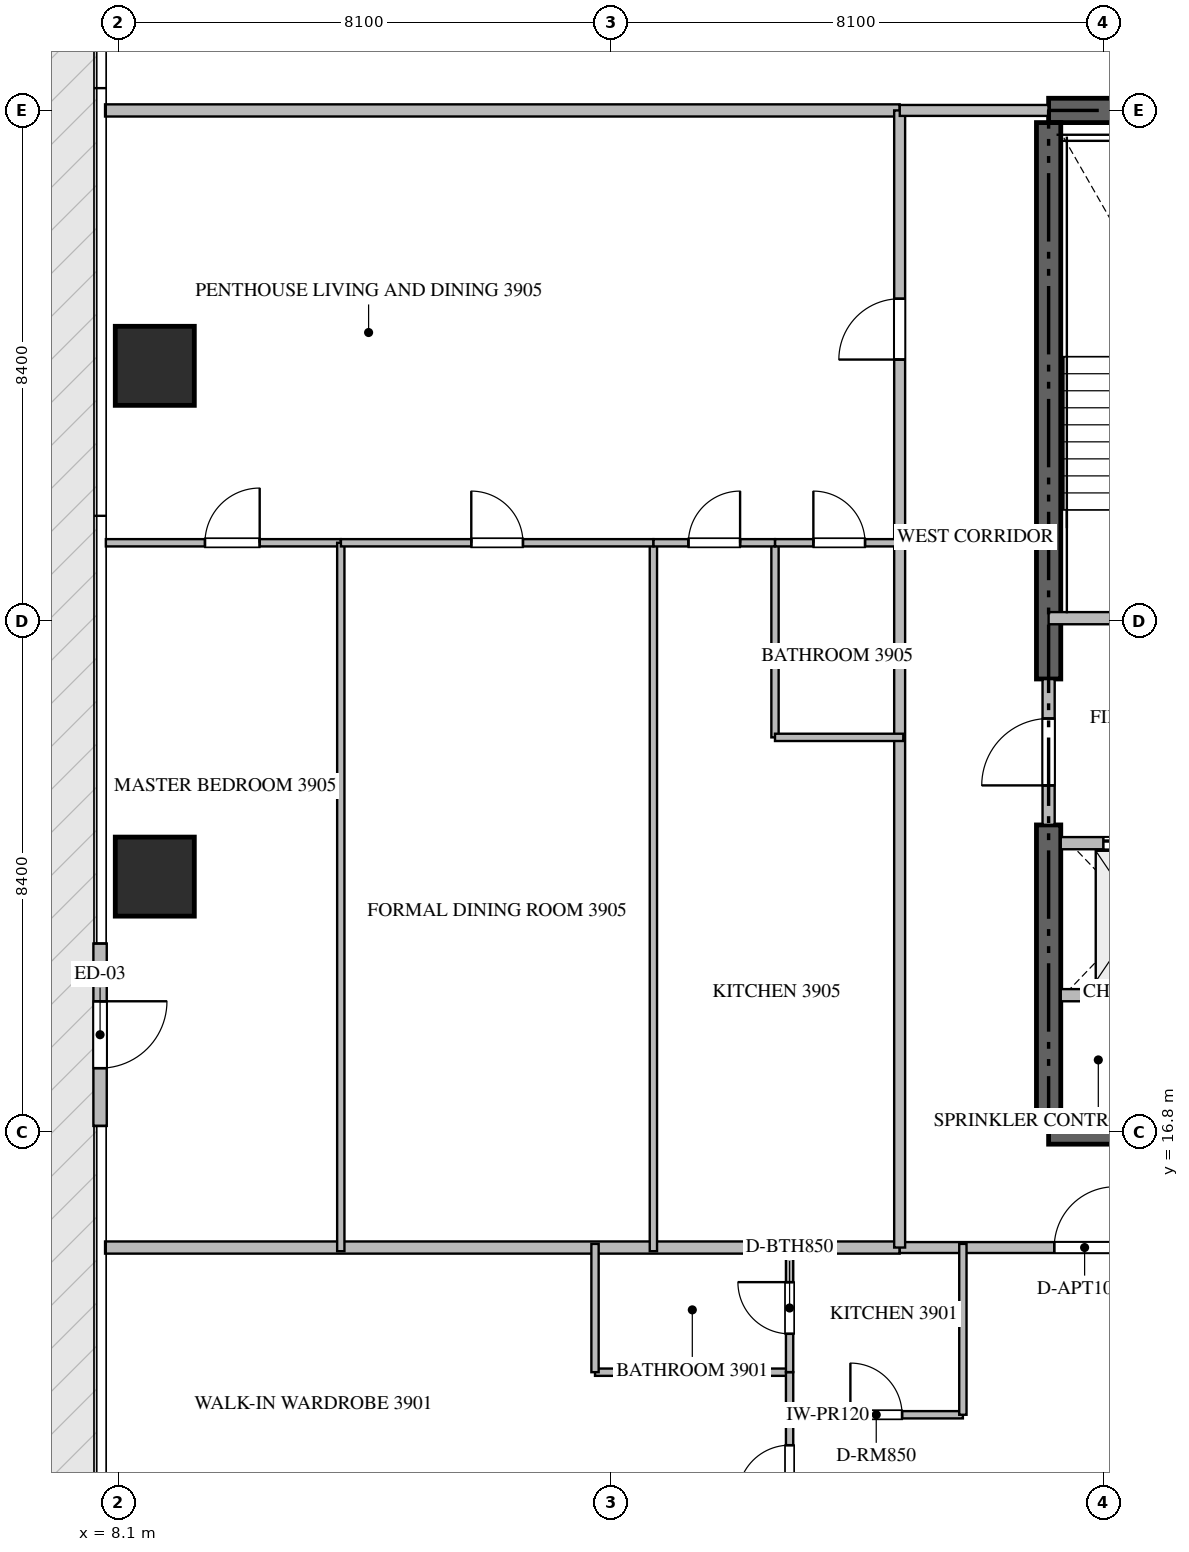
"""IFC4 building model, lengths in metres.
Left out: names, types, materials, properties, quantities, classifications, styles, units other than length and angle.
Written with IfcOpenShell. Run it as: python <this file> out.ifc"""

import sys

from ifc_helpers import new_model, si_unit, direction, frame, frame_2d, origin, origin_2d, place, context, subcontext, project, spatial, rectangle, extrude, source, transform, mapped, element, fill, save


model = new_model("IFC4")
c1 = context("Model", 3, precision=1e-05, world=origin(), true_north=direction((0.0, 1.0)))
c2 = subcontext(c1, "Body", "Model", "MODEL_VIEW")
j1 = project(units=[si_unit("LENGTHUNIT", "METRE"), si_unit("PLANEANGLEUNIT", "RADIAN")], contexts=[c1])
p1 = place(None, origin())
s1 = spatial("IfcSite", under=j1, at=p1, CompositionType="ELEMENT")
p2 = place(p1, origin())
s2 = spatial("IfcBuilding", under=s1, at=p2, CompositionType="ELEMENT")
p3 = place(p2, frame((0.0, 0.0, 157.65)))
s3 = spatial("IfcBuildingStorey", under=s2, at=p3, CompositionType="ELEMENT", Elevation=157.65)
for number, where, z_axis, x_axis in (
    (1, (23.4, 16.8, -0.26), (0.0, 0.0, 1.0), (1.0, 0.0, 0.0)),
    (2, (41.4, 33.6, -0.26), (0.0, 0.0, 1.0), (-1.0, 0.0, 0.0)),
):
    element("IfcWall", number, at=place(p3, frame(where, z_axis=z_axis, x_axis=x_axis)), inside=s3, PredefinedType="SHEAR", context=c2, shape_type="SweptSolid", body=[
        extrude(rectangle(XDim=18.0, YDim=0.4, at=frame_2d((9.0, 0.0))), origin(), (0.0, 0.0, 1.0), 3.748),
    ])
p4 = place(p3, frame((23.4, 17.0, -0.26), z_axis=(0.0, 0.0, 1.0), x_axis=(0.0, 1.0, 0.0)))
e3 = element("IfcWall", 3, at=p4, inside=s3, PredefinedType="SHEAR", context=c2, shape_type="SweptSolid", body=[
    extrude(rectangle(XDim=4.85, YDim=0.4, at=frame_2d((2.425, 0.0))), origin(), (0.0, 0.0, 1.0), 3.748),
])
p5 = place(p3, frame((23.4, 24.25, -0.26), z_axis=(0.0, 0.0, 1.0), x_axis=(0.0, 1.0, 0.0)))
e4 = element("IfcWall", 4, at=p5, inside=s3, PredefinedType="SHEAR", context=c2, shape_type="SweptSolid", body=[
    extrude(rectangle(XDim=9.15, YDim=0.4, at=frame_2d((4.575, 0.0))), origin(), (0.0, 0.0, 1.0), 3.748),
])
m1 = source(origin(), c2, "Body", "SweptSolid", [
    extrude(rectangle(XDim=1.3, YDim=1.3, at=origin_2d()), origin(), (0.0, 0.0, 1.0), 3.75),
])
for number, where, z_axis, x_axis in (
    (5, (8.7, 21.0, -0.26), (0.0, 0.0, 1.0), (1.0, 0.0, 0.0)),
    (6, (8.7, 29.4, -0.26), (0.0, 0.0, 1.0), (1.0, 0.0, 0.0)),
):
    element("IfcColumn", number, at=place(p3, frame(where, z_axis=z_axis, x_axis=x_axis)), inside=s3, PredefinedType="COLUMN", context=c2, shape_type="MappedRepresentation", body=[
        mapped(m1, transform((0.0, 0.0, 0.0), scale=1.0)),
    ])
p6 = place(p3, frame((7.8, 19.9, 0.0), z_axis=(0.0, 0.0, 1.0), x_axis=(0.0, -1.0, 0.0)))
e7 = element("IfcWall", 7, at=p6, inside=s3, PredefinedType="ELEMENTEDWALL", context=c2, shape_type="SweptSolid", body=[
    extrude(rectangle(XDim=3.0, YDim=0.22, at=frame_2d((1.5, 0.0))), origin(), (0.0, 0.0, 1.0), 3.475),
])
p7 = place(p6, frame((0.95, 0.0, 0.0)))
e8 = element("IfcOpeningElement", 8, at=p7, cuts=e7, PredefinedType="OPENING", context=c2, shape_type="SweptSolid", body=[
    extrude(rectangle(XDim=1.1, YDim=2.2, at=frame_2d((0.55, 1.1))), frame((0.0, 0.12, 0.0), z_axis=(0.0, -1.0, 0.0), x_axis=(1.0, 0.0, 0.0)), (0.0, 0.0, 1.0), 0.24),
])
p8 = place(p3, frame((23.4, 25.25, 0.0), z_axis=(0.0, 0.0, 1.0), x_axis=(1.0, 0.0, 0.0)))
e9 = element("IfcWall", 9, at=p8, inside=s3, PredefinedType="STANDARD", context=c2, shape_type="SweptSolid", body=[
    extrude(rectangle(XDim=4.45, YDim=0.2, at=frame_2d((2.225, 0.0))), origin(), (0.0, 0.0, 1.0), 3.49),
])
p9 = place(p8, frame((1.65, 0.0, 0.0)))
e10 = element("IfcOpeningElement", 10, at=p9, cuts=e9, PredefinedType="OPENING", context=c2, shape_type="SweptSolid", body=[
    extrude(rectangle(XDim=1.1, YDim=2.15, at=frame_2d((0.55, 1.075))), frame((0.0, 0.11, 0.0), z_axis=(0.0, -1.0, 0.0), x_axis=(1.0, 0.0, 0.0)), (0.0, 0.0, 1.0), 0.22),
])
p10 = place(p3, frame((23.6, 21.55, 0.0), z_axis=(0.0, 0.0, 1.0), x_axis=(1.0, 0.0, 0.0)))
e11 = element("IfcWall", 11, at=p10, inside=s3, PredefinedType="STANDARD", context=c2, shape_type="SweptSolid", body=[
    extrude(rectangle(XDim=2.45, YDim=0.2, at=frame_2d((1.225, 0.0))), origin(), (0.0, 0.0, 1.0), 3.49),
])
p11 = place(p10, frame((0.7, 0.0, 0.0)))
e12 = element("IfcOpeningElement", 12, at=p11, cuts=e11, PredefinedType="OPENING", context=c2, shape_type="SweptSolid", body=[
    extrude(rectangle(XDim=1.2, YDim=2.2, at=frame_2d((0.6, 1.1))), frame((0.0, 0.11, 0.0), z_axis=(0.0, -1.0, 0.0), x_axis=(1.0, 0.0, 0.0)), (0.0, 0.0, 1.0), 0.22),
])
p12 = place(p3, frame((23.6, 19.05, 0.0), z_axis=(0.0, 0.0, 1.0), x_axis=(1.0, 0.0, 0.0)))
e13 = element("IfcWall", 13, at=p12, inside=s3, PredefinedType="STANDARD", context=c2, shape_type="SweptSolid", body=[
    extrude(rectangle(XDim=2.45, YDim=0.2, at=frame_2d((1.225, 0.0))), origin(), (0.0, 0.0, 1.0), 3.49),
])
p13 = place(p3, frame((23.4, 21.852, 0.0), z_axis=(0.0, 0.0, 1.0), x_axis=(0.0, 1.0, 0.0)))
e14 = element("IfcWall", 14, at=p13, inside=s3, PredefinedType="STANDARD", context=c2, shape_type="SweptSolid", body=[
    extrude(rectangle(XDim=2.396, YDim=0.2, at=frame_2d((1.198, 0.0))), origin(), (0.0, 0.0, 1.0), 3.49),
])
p14 = place(p13, frame((0.648, 0.0, 0.0)))
e15 = element("IfcOpeningElement", 15, at=p14, cuts=e14, PredefinedType="OPENING", context=c2, shape_type="SweptSolid", body=[
    extrude(rectangle(XDim=1.1, YDim=2.15, at=frame_2d((0.55, 1.075))), frame((0.0, 0.11, 0.0), z_axis=(0.0, -1.0, 0.0), x_axis=(1.0, 0.0, 0.0)), (0.0, 0.0, 1.0), 0.22),
])
for number, where, z_axis, x_axis in (
    (16, (7.882, 14.9, 0.0), (0.0, 0.0, 1.0), (1.0, 0.0, 0.0)),
    (17, (7.882, 33.6, 0.0), (0.0, 0.0, 1.0), (1.0, 0.0, 0.0)),
):
    element("IfcWall", number, at=place(p3, frame(where, z_axis=z_axis, x_axis=x_axis)), inside=s3, PredefinedType="PARTITIONING", context=c2, shape_type="SweptSolid", body=[
        extrude(rectangle(XDim=13.068, YDim=0.2, at=frame_2d((6.534, 0.0))), origin(), (0.0, 0.0, 1.0), 3.49),
    ])
p15 = place(p3, frame((20.952, 14.9, 0.0), z_axis=(0.0, 0.0, 1.0), x_axis=(1.0, 0.0, 0.0)))
e18 = element("IfcWall", 18, at=p15, inside=s3, PredefinedType="PARTITIONING", context=c2, shape_type="SweptSolid", body=[
    extrude(rectangle(XDim=22.896, YDim=0.18, at=frame_2d((11.448, 0.0))), origin(), (0.0, 0.0, 1.0), 3.49),
])
p16 = place(p15, frame((2.54, 0.0, 0.0)))
e19 = element("IfcOpeningElement", 19, at=p16, cuts=e18, PredefinedType="OPENING", context=c2, shape_type="SweptSolid", body=[
    extrude(rectangle(XDim=1.0, YDim=2.15, at=frame_2d((0.5, 1.075))), frame((0.0, 0.1, 0.0), z_axis=(0.0, -1.0, 0.0), x_axis=(1.0, 0.0, 0.0)), (0.0, 0.0, 1.0), 0.2),
])
p17 = place(p15, frame((6.985, 0.0, 0.0)))
e20 = element("IfcOpeningElement", 20, at=p17, cuts=e18, PredefinedType="OPENING", context=c2, shape_type="SweptSolid", body=[
    extrude(rectangle(XDim=1.0, YDim=2.15, at=frame_2d((0.5, 1.075))), frame((0.0, 0.1, 0.0), z_axis=(0.0, -1.0, 0.0), x_axis=(1.0, 0.0, 0.0)), (0.0, 0.0, 1.0), 0.2),
])
p18 = place(p15, frame((19.356, 0.0, 0.0)))
e21 = element("IfcOpeningElement", 21, at=p18, cuts=e18, PredefinedType="OPENING", context=c2, shape_type="SweptSolid", body=[
    extrude(rectangle(XDim=1.0, YDim=2.15, at=frame_2d((0.5, 1.075))), frame((0.0, 0.1, 0.0), z_axis=(0.0, -1.0, 0.0), x_axis=(1.0, 0.0, 0.0)), (0.0, 0.0, 1.0), 0.2),
])
p19 = place(p3, frame((20.95, 14.9, 0.0), z_axis=(0.0, 0.0, 1.0), x_axis=(0.0, 1.0, 0.0)))
e22 = element("IfcWall", 22, at=p19, inside=s3, PredefinedType="PARTITIONING", context=c2, shape_type="SweptSolid", body=[
    extrude(rectangle(XDim=18.7, YDim=0.18, at=frame_2d((9.35, 0.0))), origin(), (0.0, 0.0, 1.0), 3.49),
])
p20 = place(p19, frame((14.603, 0.0, 0.0)))
e23 = element("IfcOpeningElement", 23, at=p20, cuts=e22, PredefinedType="OPENING", context=c2, shape_type="SweptSolid", body=[
    extrude(rectangle(XDim=1.0, YDim=2.15, at=frame_2d((0.5, 1.075))), frame((0.0, 0.1, 0.0), z_axis=(0.0, -1.0, 0.0), x_axis=(1.0, 0.0, 0.0)), (0.0, 0.0, 1.0), 0.2),
])
p21 = place(p3, frame((20.952, 33.6, 0.0), z_axis=(0.0, 0.0, 1.0), x_axis=(1.0, 0.0, 0.0)))
e24 = element("IfcWall", 24, at=p21, inside=s3, PredefinedType="PARTITIONING", context=c2, shape_type="SweptSolid", body=[
    extrude(rectangle(XDim=2.446, YDim=0.18, at=frame_2d((1.223, 0.0))), origin(), (0.0, 0.0, 1.0), 3.49),
])
p22 = place(p3, frame((19.14, 12.15, 0.0), z_axis=(0.0, 0.0, 1.0), x_axis=(1.0, 0.0, 0.0)))
e25 = element("IfcWall", 25, at=p22, inside=s3, PredefinedType="PARTITIONING", context=c2, shape_type="SweptSolid", body=[
    extrude(rectangle(XDim=2.85, YDim=0.12, at=frame_2d((1.425, 0.0))), origin(), (0.0, 0.0, 1.0), 3.49),
])
p23 = place(p22, frame((1.0, 0.0, 0.0)))
e26 = element("IfcOpeningElement", 26, at=p23, cuts=e25, PredefinedType="OPENING", context=c2, shape_type="SweptSolid", body=[
    extrude(rectangle(XDim=0.85, YDim=2.1, at=frame_2d((0.425, 1.05))), frame((0.0, 0.07, 0.0), z_axis=(0.0, -1.0, 0.0), x_axis=(1.0, 0.0, 0.0)), (0.0, 0.0, 1.0), 0.14),
])
p24 = place(p3, frame((21.99, 12.15, 0.0), z_axis=(0.0, 0.0, 1.0), x_axis=(0.0, 1.0, 0.0)))
e27 = element("IfcWall", 27, at=p24, inside=s3, PredefinedType="PARTITIONING", context=c2, shape_type="SweptSolid", body=[
    extrude(rectangle(XDim=2.81, YDim=0.12, at=frame_2d((1.405, 0.0))), origin(), (0.0, 0.0, 1.0), 3.49),
])
p25 = place(p3, frame((15.94, 12.85, 0.0), z_axis=(0.0, 0.0, 1.0), x_axis=(1.0, 0.0, 0.0)))
e28 = element("IfcWall", 28, at=p25, inside=s3, PredefinedType="PARTITIONING", context=c2, shape_type="SweptSolid", body=[
    extrude(rectangle(XDim=3.2, YDim=0.12, at=frame_2d((1.6, 0.0))), origin(), (0.0, 0.0, 1.0), 3.49),
])
p26 = place(p3, frame((15.94, 12.85, 0.0), z_axis=(0.0, 0.0, 1.0), x_axis=(0.0, 1.0, 0.0)))
e29 = element("IfcWall", 29, at=p26, inside=s3, PredefinedType="PARTITIONING", context=c2, shape_type="SweptSolid", body=[
    extrude(rectangle(XDim=2.11, YDim=0.12, at=frame_2d((1.055, 0.0))), origin(), (0.0, 0.0, 1.0), 3.49),
])
p27 = place(p3, frame((19.14, 9.6, 0.0), z_axis=(0.0, 0.0, 1.0), x_axis=(0.0, 1.0, 0.0)))
e30 = element("IfcWall", 30, at=p27, inside=s3, PredefinedType="PARTITIONING", context=c2, shape_type="SweptSolid", body=[
    extrude(rectangle(XDim=3.25, YDim=0.12, at=frame_2d((1.625, 0.0))), origin(), (0.0, 0.0, 1.0), 3.49),
])
p28 = place(p27, frame((1.2, 0.0, 0.0)))
e31 = element("IfcOpeningElement", 31, at=p28, cuts=e30, PredefinedType="OPENING", context=c2, shape_type="SweptSolid", body=[
    extrude(rectangle(XDim=0.85, YDim=2.1, at=frame_2d((0.425, 1.05))), frame((0.0, 0.07, 0.0), z_axis=(0.0, -1.0, 0.0), x_axis=(1.0, 0.0, 0.0)), (0.0, 0.0, 1.0), 0.14),
])
p29 = place(p3, frame((19.14, 12.852, 0.0), z_axis=(0.0, 0.0, 1.0), x_axis=(0.0, 1.0, 0.0)))
e32 = element("IfcWall", 32, at=p29, inside=s3, PredefinedType="PARTITIONING", context=c2, shape_type="SweptSolid", body=[
    extrude(rectangle(XDim=2.108, YDim=0.12, at=frame_2d((1.054, 0.0))), origin(), (0.0, 0.0, 1.0), 3.49),
])
p30 = place(p29, frame((0.629, 0.0, 0.0)))
e33 = element("IfcOpeningElement", 33, at=p30, cuts=e32, PredefinedType="OPENING", context=c2, shape_type="SweptSolid", body=[
    extrude(rectangle(XDim=0.85, YDim=2.1, at=frame_2d((0.425, 1.05))), frame((0.0, 0.07, 0.0), z_axis=(0.0, -1.0, 0.0), x_axis=(1.0, 0.0, 0.0)), (0.0, 0.0, 1.0), 0.14),
])
p31 = place(p3, frame((7.895, 26.49, 0.0), z_axis=(0.0, 0.0, 1.0), x_axis=(1.0, 0.0, 0.0)))
e34 = element("IfcWall", 34, at=p31, inside=s3, PredefinedType="PARTITIONING", context=c2, shape_type="SweptSolid", body=[
    extrude(rectangle(XDim=3.864, YDim=0.12, at=frame_2d((1.932, 0.0))), origin(), (0.0, 0.0, 1.0), 3.49),
])
p32 = place(p31, frame((1.63, 0.0, 0.0)))
e35 = element("IfcOpeningElement", 35, at=p32, cuts=e34, PredefinedType="OPENING", context=c2, shape_type="SweptSolid", body=[
    extrude(rectangle(XDim=0.9, YDim=2.1, at=frame_2d((0.45, 1.05))), frame((0.0, 0.07, 0.0), z_axis=(0.0, -1.0, 0.0), x_axis=(1.0, 0.0, 0.0)), (0.0, 0.0, 1.0), 0.14),
])
p33 = place(p3, frame((11.759, 14.84, 0.0), z_axis=(0.0, 0.0, 1.0), x_axis=(0.0, 1.0, 0.0)))
e36 = element("IfcWall", 36, at=p33, inside=s3, PredefinedType="PARTITIONING", context=c2, shape_type="SweptSolid", body=[
    extrude(rectangle(XDim=11.65, YDim=0.12, at=frame_2d((5.825, 0.0))), origin(), (0.0, 0.0, 1.0), 3.49),
])
p34 = place(p3, frame((16.9, 14.84, 0.0), z_axis=(0.0, 0.0, 1.0), x_axis=(0.0, 1.0, 0.0)))
e37 = element("IfcWall", 37, at=p34, inside=s3, PredefinedType="PARTITIONING", context=c2, shape_type="SweptSolid", body=[
    extrude(rectangle(XDim=11.65, YDim=0.12, at=frame_2d((5.825, 0.0))), origin(), (0.0, 0.0, 1.0), 2.972),
])
p35 = place(p3, frame((18.9, 23.29, 0.0), z_axis=(0.0, 0.0, 1.0), x_axis=(0.0, 1.0, 0.0)))
e38 = element("IfcWall", 38, at=p35, inside=s3, PredefinedType="PARTITIONING", context=c2, shape_type="SweptSolid", body=[
    extrude(rectangle(XDim=3.2, YDim=0.12, at=frame_2d((1.6, 0.0))), origin(), (0.0, 0.0, 1.0), 3.49),
])
p36 = place(p3, frame((18.9, 23.29, 0.0), z_axis=(0.0, 0.0, 1.0), x_axis=(1.0, 0.0, 0.0)))
e39 = element("IfcWall", 39, at=p36, inside=s3, PredefinedType="PARTITIONING", context=c2, shape_type="SweptSolid", body=[
    extrude(rectangle(XDim=2.11, YDim=0.12, at=frame_2d((1.055, 0.0))), origin(), (0.0, 0.0, 1.0), 3.49),
])
p37 = place(p3, frame((11.761, 26.49, 0.0), z_axis=(0.0, 0.0, 1.0), x_axis=(1.0, 0.0, 0.0)))
e40 = element("IfcWall", 40, at=p37, inside=s3, PredefinedType="PARTITIONING", context=c2, shape_type="SweptSolid", body=[
    extrude(rectangle(XDim=5.139, YDim=0.12, at=frame_2d((2.569, 0.0))), origin(), (0.0, 0.0, 1.0), 3.49),
])
p38 = place(p37, frame((2.144, 0.0, 0.0)))
e41 = element("IfcOpeningElement", 41, at=p38, cuts=e40, PredefinedType="OPENING", context=c2, shape_type="SweptSolid", body=[
    extrude(rectangle(XDim=0.85, YDim=2.1, at=frame_2d((0.425, 1.05))), frame((0.0, 0.07, 0.0), z_axis=(0.0, -1.0, 0.0), x_axis=(1.0, 0.0, 0.0)), (0.0, 0.0, 1.0), 0.14),
])
p39 = place(p3, frame((16.902, 26.49, 0.0), z_axis=(0.0, 0.0, 1.0), x_axis=(1.0, 0.0, 0.0)))
e42 = element("IfcWall", 42, at=p39, inside=s3, PredefinedType="PARTITIONING", context=c2, shape_type="SweptSolid", body=[
    extrude(rectangle(XDim=1.998, YDim=0.12, at=frame_2d((0.999, 0.0))), origin(), (0.0, 0.0, 1.0), 3.49),
])
p40 = place(p39, frame((0.574, 0.0, 0.0)))
e43 = element("IfcOpeningElement", 43, at=p40, cuts=e42, PredefinedType="OPENING", context=c2, shape_type="SweptSolid", body=[
    extrude(rectangle(XDim=0.85, YDim=2.1, at=frame_2d((0.425, 1.05))), frame((0.0, 0.07, 0.0), z_axis=(0.0, -1.0, 0.0), x_axis=(1.0, 0.0, 0.0)), (0.0, 0.0, 1.0), 0.14),
])
p41 = place(p3, frame((18.902, 26.49, 0.0), z_axis=(0.0, 0.0, 1.0), x_axis=(1.0, 0.0, 0.0)))
e44 = element("IfcWall", 44, at=p41, inside=s3, PredefinedType="PARTITIONING", context=c2, shape_type="SweptSolid", body=[
    extrude(rectangle(XDim=2.108, YDim=0.12, at=frame_2d((1.054, 0.0))), origin(), (0.0, 0.0, 1.0), 3.49),
])
p42 = place(p41, frame((0.629, 0.0, 0.0)))
e45 = element("IfcOpeningElement", 45, at=p42, cuts=e44, PredefinedType="OPENING", context=c2, shape_type="SweptSolid", body=[
    extrude(rectangle(XDim=0.85, YDim=2.1, at=frame_2d((0.425, 1.05))), frame((0.0, 0.07, 0.0), z_axis=(0.0, -1.0, 0.0), x_axis=(1.0, 0.0, 0.0)), (0.0, 0.0, 1.0), 0.14),
])
m2 = source(origin(), c2, "Body", "SweptSolid", [
    extrude(rectangle(XDim=1.1, YDim=2.2, at=frame_2d((0.55, 1.1))), frame((0.0, 0.025, 0.0), z_axis=(0.0, -1.0, 0.0), x_axis=(1.0, 0.0, 0.0)), (0.0, 0.0, 1.0), 0.05),
])
p43 = place(p7, origin())
e46 = element("IfcDoor", 46, at=p43, inside=s3, OperationType="SINGLE_SWING_LEFT", PredefinedType="DOOR", context=c2, shape_type="MappedRepresentation", body=[
    mapped(m2, transform((0.0, 0.0, 0.0), scale=1.0)),
])
fill(e8, e46)
m3 = source(origin(), c2, "Body", "SweptSolid", [
    extrude(rectangle(XDim=1.2, YDim=2.2, at=frame_2d((0.6, 1.1))), frame((0.0, 0.025, 0.0), z_axis=(0.0, -1.0, 0.0), x_axis=(1.0, 0.0, 0.0)), (0.0, 0.0, 1.0), 0.05),
])
p44 = place(p11, origin())
e47 = element("IfcDoor", 47, at=p44, inside=s3, OperationType="DOUBLE_DOOR_SLIDING", PredefinedType="DOOR", context=c2, shape_type="MappedRepresentation", body=[
    mapped(m3, transform((0.0, 0.0, 0.0), scale=1.0)),
])
fill(e12, e47)
m4 = source(origin(), c2, "Body", "SweptSolid", [
    extrude(rectangle(XDim=1.1, YDim=2.15, at=frame_2d((0.55, 1.075))), frame((0.0, 0.025, 0.0), z_axis=(0.0, -1.0, 0.0), x_axis=(1.0, 0.0, 0.0)), (0.0, 0.0, 1.0), 0.05),
])
p45 = place(p14, origin())
e48 = element("IfcDoor", 48, at=p45, inside=s3, OperationType="SINGLE_SWING_LEFT", PredefinedType="DOOR", context=c2, shape_type="MappedRepresentation", body=[
    mapped(m4, transform((0.0, 0.0, 0.0), scale=1.0)),
])
fill(e15, e48)
m5 = source(origin(), c2, "Body", "SweptSolid", [
    extrude(rectangle(XDim=1.0, YDim=2.15, at=frame_2d((0.5, 1.075))), frame((0.0, 0.025, 0.0), z_axis=(0.0, -1.0, 0.0), x_axis=(1.0, 0.0, 0.0)), (0.0, 0.0, 1.0), 0.05),
])
p46 = place(p16, origin())
e49 = element("IfcDoor", 49, at=p46, inside=s3, OperationType="SINGLE_SWING_RIGHT", PredefinedType="DOOR", context=c2, shape_type="MappedRepresentation", body=[
    mapped(m5, transform((0.0, 0.0, 0.0), scale=1.0)),
])
fill(e19, e49)
p47 = place(p20, origin())
e50 = element("IfcDoor", 50, at=p47, inside=s3, OperationType="SINGLE_SWING_LEFT", PredefinedType="DOOR", context=c2, shape_type="MappedRepresentation", body=[
    mapped(m5, transform((0.0, 0.0, 0.0), scale=1.0)),
])
fill(e23, e50)
m6 = source(origin(), c2, "Body", "SweptSolid", [
    extrude(rectangle(XDim=0.85, YDim=2.1, at=frame_2d((0.425, 1.05))), frame((0.0, 0.025, 0.0), z_axis=(0.0, -1.0, 0.0), x_axis=(1.0, 0.0, 0.0)), (0.0, 0.0, 1.0), 0.05),
])
p48 = place(p23, origin())
e51 = element("IfcDoor", 51, at=p48, inside=s3, OperationType="SINGLE_SWING_LEFT", PredefinedType="DOOR", context=c2, shape_type="MappedRepresentation", body=[
    mapped(m6, transform((0.0, 0.0, 0.0), scale=1.0)),
])
fill(e26, e51)
p49 = place(p28, origin())
e52 = element("IfcDoor", 52, at=p49, inside=s3, OperationType="SINGLE_SWING_LEFT", PredefinedType="DOOR", context=c2, shape_type="MappedRepresentation", body=[
    mapped(m6, transform((0.0, 0.0, 0.0), scale=1.0)),
])
fill(e31, e52)
p50 = place(p30, origin())
e53 = element("IfcDoor", 53, at=p50, inside=s3, OperationType="SINGLE_SWING_RIGHT", PredefinedType="DOOR", context=c2, shape_type="MappedRepresentation", body=[
    mapped(m6, transform((0.0, 0.0, 0.0), scale=1.0)),
])
fill(e33, e53)
m7 = source(origin(), c2, "Body", "SweptSolid", [
    extrude(rectangle(XDim=0.9, YDim=2.1, at=frame_2d((0.45, 1.05))), frame((0.0, 0.025, 0.0), z_axis=(0.0, -1.0, 0.0), x_axis=(1.0, 0.0, 0.0)), (0.0, 0.0, 1.0), 0.05),
])
p51 = place(p32, origin())
e54 = element("IfcDoor", 54, at=p51, inside=s3, OperationType="SINGLE_SWING_RIGHT", PredefinedType="DOOR", context=c2, shape_type="MappedRepresentation", body=[
    mapped(m7, transform((0.0, 0.0, 0.0), scale=1.0)),
])
fill(e35, e54)
p52 = place(p38, origin())
e55 = element("IfcDoor", 55, at=p52, inside=s3, OperationType="SINGLE_SWING_LEFT", PredefinedType="DOOR", context=c2, shape_type="MappedRepresentation", body=[
    mapped(m6, transform((0.0, 0.0, 0.0), scale=1.0)),
])
fill(e41, e55)
p53 = place(p40, origin())
e56 = element("IfcDoor", 56, at=p53, inside=s3, OperationType="SINGLE_SWING_RIGHT", PredefinedType="DOOR", context=c2, shape_type="MappedRepresentation", body=[
    mapped(m6, transform((0.0, 0.0, 0.0), scale=1.0)),
])
fill(e43, e56)
p54 = place(p42, origin())
e57 = element("IfcDoor", 57, at=p54, inside=s3, OperationType="SINGLE_SWING_LEFT", PredefinedType="DOOR", context=c2, shape_type="MappedRepresentation", body=[
    mapped(m6, transform((0.0, 0.0, 0.0), scale=1.0)),
])
fill(e45, e57)
save(model, sys.argv[1])
